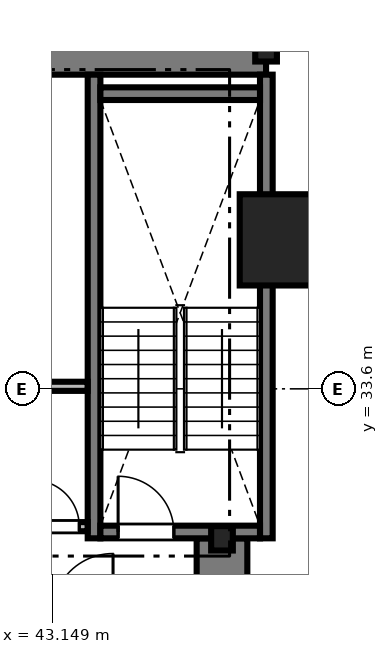
"""IFC4 building model, lengths in metres.
Left out: names, types, materials, properties, quantities, classifications, styles, units other than length and angle.
Written with IfcOpenShell. Run it as: python <this file> out.ifc"""

import sys

from ifc_helpers import new_model, si_unit, direction, frame, frame_2d, origin, origin_2d, place, context, subcontext, project, spatial, rectangle, i_section, extrude, source, transform, mapped, element, fill, save


model = new_model("IFC4")
c1 = context("Model", 3, precision=1e-05, world=origin(), true_north=direction((0.0, 1.0)))
c2 = subcontext(c1, "Body", "Model", "MODEL_VIEW")
j1 = project(units=[si_unit("LENGTHUNIT", "METRE"), si_unit("PLANEANGLEUNIT", "RADIAN")], contexts=[c1])
p1 = place(None, origin())
s1 = spatial("IfcSite", under=j1, at=p1, CompositionType="ELEMENT")
p2 = place(p1, origin())
s2 = spatial("IfcBuilding", under=s1, at=p2, CompositionType="ELEMENT")
p3 = place(p2, frame((0.0, 0.0, 49.5)))
s3 = spatial("IfcBuildingStorey", under=s2, at=p3, CompositionType="ELEMENT", Elevation=49.5)
m1 = source(origin(), c2, "Body", "SweptSolid", [
    extrude(rectangle(XDim=17.52, YDim=1.0, at=frame_2d((8.76, 0.0))), origin(), (0.0, 0.0, 1.0), 3.41),
])
p4 = place(p3, frame((29.85, 40.3, 0.0), z_axis=(0.0, 0.0, 1.0), x_axis=(1.0, 0.0, 0.0)))
e1 = element("IfcWall", 1, at=p4, inside=s3, PredefinedType="SHEAR", context=c2, shape_type="MappedRepresentation", body=[
    mapped(m1, transform((0.0, 0.0, 0.0), scale=1.0)),
])
m2 = source(origin(), c2, "Body", "SweptSolid", [
    extrude(rectangle(XDim=13.15, YDim=1.0, at=frame_2d((6.575, 0.0))), origin(), (0.0, 0.0, 1.0), 3.41),
])
p5 = place(p3, frame((46.5, 17.5, 0.0), z_axis=(0.0, 0.0, 1.0), x_axis=(0.0, 1.0, 0.0)))
e2 = element("IfcWall", 2, at=p5, inside=s3, PredefinedType="SHEAR", context=c2, shape_type="MappedRepresentation", body=[
    mapped(m2, transform((0.0, 0.0, 0.0), scale=1.0)),
])
m3 = source(origin(), c2, "Body", "SweptSolid", [
    extrude(i_section(OverallWidth=0.428, OverallDepth=0.481, WebThickness=0.04, FlangeThickness=0.063, FilletRadius=0.015, at=origin_2d()), origin(), (0.0, 0.0, 1.0), 3.41),
])
for number, where, z_axis, x_axis in (
    (3, (46.5, 30.65, 0.0), (0.0, 0.0, 1.0), (1.0, 0.0, 0.0)),
    (4, (47.37, 40.3, 0.0), (0.0, 0.0, 1.0), (1.0, 0.0, 0.0)),
):
    element("IfcColumn", number, at=place(p3, frame(where, z_axis=z_axis, x_axis=x_axis)), inside=s3, PredefinedType="COLUMN", context=c2, shape_type="MappedRepresentation", body=[
        mapped(m3, transform((0.0, 0.0, 0.0), scale=1.0)),
    ])
m4 = source(origin(), c2, "Body", "SweptSolid", [
    extrude(rectangle(XDim=1.8, YDim=1.8, at=origin_2d()), origin(), (0.0, 0.0, 1.0), 3.41),
])
p6 = place(p3, frame((47.75, 36.54, 0.0), z_axis=(0.0, 0.0, 1.0), x_axis=(1.0, 0.0, 0.0)))
e5 = element("IfcColumn", 5, at=p6, inside=s3, PredefinedType="COLUMN", context=c2, shape_type="MappedRepresentation", body=[
    mapped(m4, transform((0.0, 0.0, 0.0), scale=1.0)),
])
m5 = source(origin(), c2, "Body", "SweptSolid", [
    extrude(rectangle(XDim=9.15, YDim=0.25, at=frame_2d((4.575, 0.0))), origin(), (0.0, 0.0, 1.0), 3.45),
])
for number, where, z_axis, x_axis in (
    (6, (43.975, 30.65, 0.0), (0.0, 0.0, 1.0), (0.0, 1.0, 0.0)),
    (7, (47.375, 30.65, 0.0), (0.0, 0.0, 1.0), (0.0, 1.0, 0.0)),
):
    element("IfcWall", number, at=place(p3, frame(where, z_axis=z_axis, x_axis=x_axis)), inside=s3, PredefinedType="SOLIDWALL", context=c2, shape_type="MappedRepresentation", body=[
        mapped(m5, transform((0.0, 0.0, 0.0), scale=1.0)),
    ])
m6 = source(origin(), c2, "Body", "SweptSolid", [
    extrude(rectangle(XDim=3.15, YDim=0.25, at=frame_2d((1.575, 0.0))), origin(), (0.0, 0.0, 1.0), 3.45),
])
p7 = place(p3, frame((44.1, 39.425, 0.0), z_axis=(0.0, 0.0, 1.0), x_axis=(1.0, 0.0, 0.0)))
e8 = element("IfcWall", 8, at=p7, inside=s3, PredefinedType="SOLIDWALL", context=c2, shape_type="MappedRepresentation", body=[
    mapped(m6, transform((0.0, 0.0, 0.0), scale=1.0)),
])
p8 = place(p3, frame((44.1, 30.775, 0.0), z_axis=(0.0, 0.0, 1.0), x_axis=(1.0, 0.0, 0.0)))
e9 = element("IfcWall", 9, at=p8, inside=s3, PredefinedType="SOLIDWALL", context=c2, shape_type="MappedRepresentation", body=[
    mapped(m6, transform((0.0, 0.0, 0.0), scale=1.0)),
])
m7 = source(origin(), c2, "Body", "SweptSolid", [
    extrude(rectangle(XDim=1.1, YDim=2.2, at=frame_2d((0.55, 1.1))), frame((0.0, 0.135, 0.0), z_axis=(0.0, -1.0, 0.0), x_axis=(1.0, 0.0, 0.0)), (0.0, 0.0, 1.0), 0.27),
])
p9 = place(p8, frame((0.35, 0.0, 0.0)))
e10 = element("IfcOpeningElement", 10, at=p9, cuts=e9, PredefinedType="OPENING", context=c2, shape_type="MappedRepresentation", body=[
    mapped(m7, transform((0.0, 0.0, 0.0), scale=1.0)),
])
m8 = source(origin(), c2, "Body", "SweptSolid", [
    extrude(rectangle(XDim=1.248, YDim=0.18, at=frame_2d((0.624, 0.0))), origin(), (0.0, 0.0, 1.0), 3.41),
])
p10 = place(p3, frame((42.6, 30.88, 0.0), z_axis=(0.0, 0.0, 1.0), x_axis=(1.0, 0.0, 0.0)))
e11 = element("IfcWall", 11, at=p10, inside=s3, PredefinedType="PARTITIONING", context=c2, shape_type="MappedRepresentation", body=[
    mapped(m8, transform((0.0, 0.0, 0.0), scale=1.0)),
])
m9 = source(origin(), c2, "Body", "SweptSolid", [
    extrude(rectangle(XDim=0.92, YDim=2.1, at=frame_2d((0.46, 1.05))), frame((0.0, 0.1, 0.0), z_axis=(0.0, -1.0, 0.0), x_axis=(1.0, 0.0, 0.0)), (0.0, 0.0, 1.0), 0.2),
])
p11 = place(p10, frame((0.164, 0.0, 0.0)))
e12 = element("IfcOpeningElement", 12, at=p11, cuts=e11, PredefinedType="OPENING", context=c2, shape_type="MappedRepresentation", body=[
    mapped(m9, transform((0.0, 0.0, 0.0), scale=1.0)),
])
m10 = source(origin(), c2, "Body", "SweptSolid", [
    extrude(rectangle(XDim=1.348, YDim=0.18, at=frame_2d((0.674, 0.0))), origin(), (0.0, 0.0, 1.0), 3.41),
])
p12 = place(p3, frame((42.5, 33.65, 0.0), z_axis=(0.0, 0.0, 1.0), x_axis=(1.0, 0.0, 0.0)))
e13 = element("IfcWall", 13, at=p12, inside=s3, PredefinedType="PARTITIONING", context=c2, shape_type="MappedRepresentation", body=[
    mapped(m10, transform((0.0, 0.0, 0.0), scale=1.0)),
])
m11 = source(origin(), c2, "Body", "SweptSolid", [
    extrude(rectangle(XDim=1.1, YDim=2.2, at=frame_2d((0.55, 1.1))), frame((0.0, 0.025, 0.0), z_axis=(0.0, -1.0, 0.0), x_axis=(1.0, 0.0, 0.0)), (0.0, 0.0, 1.0), 0.05),
])
p13 = place(p9, origin())
e14 = element("IfcDoor", 14, at=p13, inside=s3, OperationType="SINGLE_SWING_LEFT", PredefinedType="DOOR", context=c2, shape_type="MappedRepresentation", body=[
    mapped(m11, transform((0.0, 0.0, 0.0), scale=1.0)),
])
fill(e10, e14)
m12 = source(origin(), c2, "Body", "SweptSolid", [
    extrude(rectangle(XDim=0.92, YDim=2.1, at=frame_2d((0.46, 1.05))), frame((0.0, 0.025, 0.0), z_axis=(0.0, -1.0, 0.0), x_axis=(1.0, 0.0, 0.0)), (0.0, 0.0, 1.0), 0.05),
])
p14 = place(p11, origin())
e15 = element("IfcDoor", 15, at=p14, inside=s3, OperationType="SINGLE_SWING_LEFT", PredefinedType="DOOR", context=c2, shape_type="MappedRepresentation", body=[
    mapped(m12, transform((0.0, 0.0, 0.0), scale=1.0)),
])
fill(e12, e15)
save(model, sys.argv[1])
